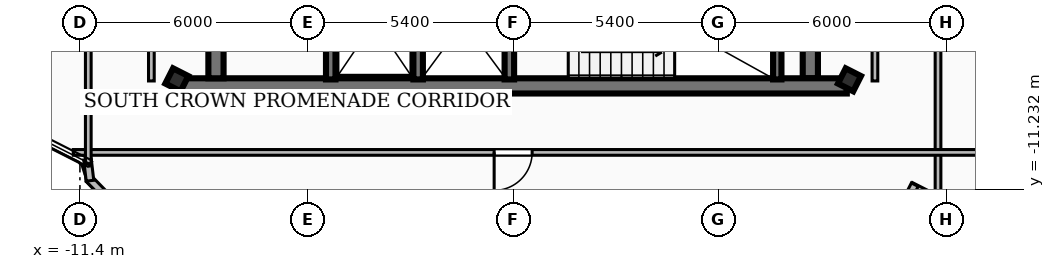
"""IFC4 building model, lengths in metres.
Left out: names, types, materials, properties, quantities, classifications, styles, units other than length and angle.
Written with IfcOpenShell. Run it as: python <this file> out.ifc"""

import sys

from ifc_helpers import new_model, si_unit, direction, frame, frame_2d, origin, origin_2d, place, context, subcontext, project, spatial, rectangle, hollow_rectangle, extrude, element, fill, save


model = new_model("IFC4")
c1 = context("Model", 3, precision=1e-05, world=origin(), true_north=direction((0.0, 1.0)))
c2 = subcontext(c1, "Body", "Model", "MODEL_VIEW")
j1 = project(units=[si_unit("LENGTHUNIT", "METRE"), si_unit("PLANEANGLEUNIT", "RADIAN")], contexts=[c1])
p1 = place(None, origin())
s1 = spatial("IfcSite", under=j1, at=p1, CompositionType="ELEMENT")
p2 = place(p1, origin())
s2 = spatial("IfcBuilding", under=s1, at=p2, CompositionType="ELEMENT")
p3 = place(p2, frame((0.0, 0.0, 289.26)))
s3 = spatial("IfcBuildingStorey", under=s2, at=p3, CompositionType="ELEMENT", Elevation=289.26)
p4 = place(p3, frame((8.78, -8.51, 0.0), z_axis=(0.0, 0.0, 1.0), x_axis=(-1.0, 0.0, 0.0)))
e1 = element("IfcWall", 1, at=p4, inside=s3, PredefinedType="SHEAR", context=c2, shape_type="SweptSolid", body=[
    extrude(rectangle(XDim=17.56, YDim=0.4, at=frame_2d((8.78, 0.0))), origin(), (0.0, 0.0, 1.0), 3.84),
])
for number, where, z_axis, x_axis in (
    (2, (-7.82, -8.31, 0.0), (0.0, 0.0, 1.0), (0.0, 1.0, 0.0)),
    (3, (7.82, -1.95, 0.0), (0.0, 0.0, 1.0), (0.0, -1.0, 0.0)),
):
    element("IfcWall", number, at=place(p3, frame(where, z_axis=z_axis, x_axis=x_axis)), inside=s3, PredefinedType="SHEAR", context=c2, shape_type="SweptSolid", body=[
        extrude(rectangle(XDim=6.36, YDim=0.4, at=frame_2d((3.18, 0.0))), origin(), (0.0, 0.0, 1.0), 3.84),
    ])
p5 = place(p3, frame((6.95, -8.34, 0.0), z_axis=(0.0, 0.0, 1.0), x_axis=(0.0, 1.0, 0.0)))
e4 = element("IfcWall", 4, at=p5, inside=s3, PredefinedType="SOLIDWALL", context=c2, shape_type="SweptSolid", body=[
    extrude(rectangle(XDim=3.06, YDim=0.22, at=frame_2d((1.53, 0.0))), origin(), (0.0, 0.0, 1.0), 3.84),
])
for number, where, z_axis, x_axis in (
    (5, (-0.1, -8.34, 0.0), (0.0, 0.0, 1.0), (0.0, 1.0, 0.0)),
    (6, (-2.5, -8.34, 0.0), (0.0, 0.0, 1.0), (0.0, 1.0, 0.0)),
    (7, (-4.8, -8.34, 0.0), (0.0, 0.0, 1.0), (0.0, 1.0, 0.0)),
):
    element("IfcWall", number, at=place(p3, frame(where, z_axis=z_axis, x_axis=x_axis)), inside=s3, PredefinedType="SOLIDWALL", context=c2, shape_type="SweptSolid", body=[
        extrude(rectangle(XDim=3.04, YDim=0.25, at=frame_2d((1.52, 0.0))), origin(), (0.0, 0.0, 1.0), 3.84),
    ])
for number, where, z_axis, x_axis in (
    (8, (8.85, -8.35, 0.0), (0.0, 0.0, 1.0), (0.452, 0.892, 0.0)),
    (9, (-8.85, -8.35, 0.0), (0.0, 0.0, 1.0), (0.452, 0.892, 0.0)),
):
    element("IfcColumn", number, at=place(p3, frame(where, z_axis=z_axis, x_axis=x_axis)), inside=s3, PredefinedType="COLUMN", context=c2, shape_type="SweptSolid", body=[
        extrude(hollow_rectangle(XDim=0.45, YDim=0.45, WallThickness=0.022, at=origin_2d()), origin(), (0.0, 0.0, 1.0), 4.14),
    ])
p6 = place(p3, frame((11.855, -11.85, 0.0), z_axis=(0.0, 0.0, 1.0), x_axis=(-0.891975264725, 0.452084203572, 0.0)))
e10 = element("IfcWall", 10, at=p6, inside=s3, PredefinedType="SOLIDWALL", context=c2, shape_type="SweptSolid", body=[
    extrude(rectangle(XDim=1.562, YDim=0.2, at=frame_2d((0.781, 0.0))), origin(), (0.0, 0.0, 1.0), 3.84),
])
p7 = place(p3, frame((10.569, -11.109, 0.0), z_axis=(0.0, 0.0, 1.0), x_axis=(-0.452141134176, -0.891946408024, 0.0)))
e11 = element("IfcWall", 11, at=p7, inside=s3, PredefinedType="SOLIDWALL", context=c2, shape_type="SweptSolid", body=[
    extrude(rectangle(XDim=8.431, YDim=0.2, at=frame_2d((4.215, 0.0))), origin(), (0.0, 0.0, 1.0), 3.84),
])
p8 = place(p7, frame((0.85, 0.0, 0.85)))
e12 = element("IfcOpeningElement", 12, at=p8, cuts=e11, PredefinedType="OPENING", context=c2, shape_type="SweptSolid", body=[
    extrude(rectangle(XDim=2.7, YDim=1.65, at=frame_2d((1.35, 0.825))), frame((0.0, 0.11, 0.0), z_axis=(0.0, -1.0, 0.0), x_axis=(1.0, 0.0, 0.0)), (0.0, 0.0, 1.0), 0.22),
])
p9 = place(p3, frame((-10.706, -11.422, 0.0), z_axis=(0.0, 0.0, 1.0), x_axis=(-0.698319106911, 0.715786577775, 0.0)))
e13 = element("IfcWall", 13, at=p9, inside=s3, PredefinedType="SOLIDWALL", context=c2, shape_type="SweptSolid", body=[
    extrude(rectangle(XDim=0.643, YDim=0.2, at=frame_2d((0.321, 0.0))), origin(), (0.0, 0.0, 1.0), 3.84),
])
p10 = place(p3, frame((-11.135, -11.005, 0.0), z_axis=(0.0, 0.0, 1.0), x_axis=(-0.117548500026, 0.993067142816, 0.0)))
e14 = element("IfcWall", 14, at=p10, inside=s3, PredefinedType="SOLIDWALL", context=c2, shape_type="SweptSolid", body=[
    extrude(rectangle(XDim=0.561, YDim=0.2, at=frame_2d((0.28, 0.0))), origin(), (0.0, 0.0, 1.0), 3.84),
])
p11 = place(p3, frame((-9.52, -8.38, 0.0), z_axis=(0.0, 0.0, 1.0), x_axis=(0.0, 1.0, 0.0)))
e15 = element("IfcWall", 15, at=p11, inside=s3, PredefinedType="PARTITIONING", context=c2, shape_type="SweptSolid", body=[
    extrude(rectangle(XDim=6.63, YDim=0.15, at=frame_2d((3.315, 0.0))), origin(), (0.0, 0.0, 1.0), 3.84),
])
p12 = place(p3, frame((9.52, -8.38, 0.0), z_axis=(0.0, 0.0, 1.0), x_axis=(0.0, 1.0, 0.0)))
e16 = element("IfcWall", 16, at=p12, inside=s3, PredefinedType="PARTITIONING", context=c2, shape_type="SweptSolid", body=[
    extrude(rectangle(XDim=6.63, YDim=0.15, at=frame_2d((3.315, 0.0))), origin(), (0.0, 0.0, 1.0), 3.21),
])
p13 = place(p3, frame((11.18, 10.522, 0.0), z_axis=(0.0, 0.0, 1.0), x_axis=(0.0, -1.0, 0.0)))
e17 = element("IfcWall", 17, at=p13, inside=s3, PredefinedType="PARTITIONING", context=c2, shape_type="SweptSolid", body=[
    extrude(rectangle(XDim=21.957, YDim=0.15, at=frame_2d((10.979, 0.0))), origin(), (0.0, 0.0, 1.0), 3.84),
])
p14 = place(p13, frame((10.022, 0.0, 0.0)))
e18 = element("IfcOpeningElement", 18, at=p14, cuts=e17, PredefinedType="OPENING", context=c2, shape_type="SweptSolid", body=[
    extrude(rectangle(XDim=1.0, YDim=2.1, at=frame_2d((0.5, 1.05))), frame((0.0, 0.085, 0.0), z_axis=(0.0, -1.0, 0.0), x_axis=(1.0, 0.0, 0.0)), (0.0, 0.0, 1.0), 0.17),
])
p15 = place(p3, frame((-11.18, -10.568, 0.0), z_axis=(0.0, 0.0, 1.0), x_axis=(0.0, 1.0, 0.0)))
e19 = element("IfcWall", 19, at=p15, inside=s3, PredefinedType="PARTITIONING", context=c2, shape_type="SweptSolid", body=[
    extrude(rectangle(XDim=22.003, YDim=0.15, at=frame_2d((11.001, 0.0))), origin(), (0.0, 0.0, 1.0), 3.84),
])
p16 = place(p15, frame((8.468, 0.0, 0.0)))
e20 = element("IfcOpeningElement", 20, at=p16, cuts=e19, PredefinedType="OPENING", context=c2, shape_type="SweptSolid", body=[
    extrude(rectangle(XDim=1.0, YDim=2.1, at=frame_2d((0.5, 1.05))), frame((0.0, 0.085, 0.0), z_axis=(0.0, -1.0, 0.0), x_axis=(1.0, 0.0, 0.0)), (0.0, 0.0, 1.0), 0.17),
])
p17 = place(p3, frame((13.584, -10.26, 0.0), z_axis=(0.0, 0.0, 1.0), x_axis=(-1.0, 0.0, 0.0)))
e21 = element("IfcWall", 21, at=p17, inside=s3, PredefinedType="PARTITIONING", context=c2, shape_type="SweptSolid", body=[
    extrude(rectangle(XDim=25.159, YDim=0.15, at=frame_2d((12.58, 0.0))), origin(), (0.0, 0.0, 1.0), 3.84),
])
p18 = place(p17, frame((13.084, 0.0, 0.0)))
e22 = element("IfcOpeningElement", 22, at=p18, cuts=e21, PredefinedType="OPENING", context=c2, shape_type="SweptSolid", body=[
    extrude(rectangle(XDim=1.0, YDim=2.1, at=frame_2d((0.5, 1.05))), frame((0.0, 0.085, 0.0), z_axis=(0.0, -1.0, 0.0), x_axis=(1.0, 0.0, 0.0)), (0.0, 0.0, 1.0), 0.17),
])
p19 = place(p18, origin())
e23 = element("IfcDoor", 23, at=p19, inside=s3, OperationType="SINGLE_SWING_RIGHT", PredefinedType="DOOR", context=c2, shape_type="SweptSolid", body=[
    extrude(rectangle(XDim=1.0, YDim=2.1, at=frame_2d((0.5, 1.05))), frame((0.0, 0.025, 0.0), z_axis=(0.0, -1.0, 0.0), x_axis=(1.0, 0.0, 0.0)), (0.0, 0.0, 1.0), 0.05),
])
fill(e22, e23)
save(model, sys.argv[1])
